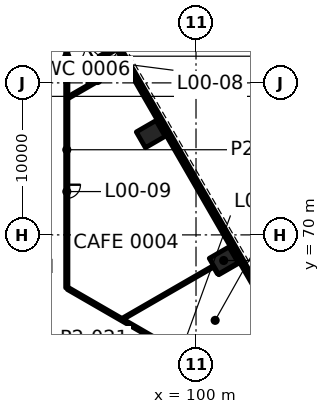
"""IFC4 building model, lengths in metres.
Left out: names, types, materials, properties, quantities, classifications, styles, units other than length and angle.
Written with IfcOpenShell. Run it as: python <this file> out.ifc"""

import sys

from ifc_helpers import new_model, si_unit, direction, frame, frame_2d, origin, origin_2d, place, context, subcontext, project, spatial, rectangle, extrude, element, fill, save


model = new_model("IFC4")
c1 = context("Model", 3, precision=1e-05, world=origin(), true_north=direction((0.0, 1.0)))
c2 = subcontext(c1, "Body", "Model", "MODEL_VIEW")
j1 = project(units=[si_unit("LENGTHUNIT", "METRE"), si_unit("PLANEANGLEUNIT", "RADIAN")], contexts=[c1])
p1 = place(None, origin())
s1 = spatial("IfcSite", under=j1, at=p1, CompositionType="ELEMENT")
p2 = place(p1, origin())
s2 = spatial("IfcBuilding", under=s1, at=p2, CompositionType="ELEMENT")
p3 = place(p2, origin())
s3 = spatial("IfcBuildingStorey", under=s2, at=p3, CompositionType="ELEMENT", Elevation=0.0)
for number, where, z_axis, x_axis in (
    (1, (101.821, 68.315, 0.0), (0.0, 0.0, 1.0), (-0.5, 0.866, 0.0)),
    (2, (97.021, 76.628, 0.0), (0.0, 0.0, 1.0), (-0.5, 0.866, 0.0)),
):
    element("IfcColumn", number, at=place(p3, frame(where, z_axis=z_axis, x_axis=x_axis)), inside=s3, PredefinedType="COLUMN", context=c2, shape_type="SweptSolid", body=[
        extrude(rectangle(XDim=1.2, YDim=1.5, at=origin_2d()), origin(), (0.0, 0.0, 1.0), 8.0),
    ])
p4 = place(p3, frame((101.471, 67.42, 0.0), z_axis=(0.0, 0.0, 1.0), x_axis=(0.866026058841, 0.499998865407, 0.0)))
e3 = element("IfcWall", 3, at=p4, inside=s3, PredefinedType="PARTITIONING", context=c2, shape_type="SweptSolid", body=[
    extrude(rectangle(XDim=1.708, YDim=0.1, at=frame_2d((0.854, 0.0))), origin(), (0.0, 0.0, 1.0), 7.1),
])
p5 = place(p3, frame((95.201, 64.493, 0.0), z_axis=(0.0, 0.0, 1.0), x_axis=(0.866031059472, 0.499990203933, 0.0)))
e4 = element("IfcWall", 4, at=p5, inside=s3, PredefinedType="PARTITIONING", context=c2, shape_type="SweptSolid", body=[
    extrude(rectangle(XDim=6.893, YDim=0.1, at=frame_2d((3.447, 0.0))), origin(), (0.0, 0.0, 1.0), 7.1),
])
p6 = place(p3, frame((91.61, 79.047, 0.0), z_axis=(0.0, 0.0, 1.0), x_axis=(0.866032485742, 0.499987733489, 0.0)))
e5 = element("IfcWall", 5, at=p6, inside=s3, PredefinedType="PARTITIONING", context=c2, shape_type="SweptSolid", body=[
    extrude(rectangle(XDim=4.435, YDim=0.12, at=frame_2d((2.217, 0.0))), origin(), (0.0, 0.0, 1.0), 6.865),
])
p7 = place(p3, frame((92.95, 81.207, 0.0), z_axis=(0.0, 0.0, 1.0), x_axis=(0.866002138589, 0.500040294336, 0.0)))
e6 = element("IfcWall", 6, at=p7, inside=s3, PredefinedType="PARTITIONING", context=c2, shape_type="SweptSolid", body=[
    extrude(rectangle(XDim=2.194, YDim=0.12, at=frame_2d((1.097, 0.0))), origin(), (0.0, 0.0, 1.0), 6.865),
])
p8 = place(p7, frame((0.468, 0.0, 0.0)))
e7 = element("IfcOpeningElement", 7, at=p8, cuts=e6, PredefinedType="OPENING", context=c2, shape_type="SweptSolid", body=[
    extrude(rectangle(XDim=0.9, YDim=2.1, at=frame_2d((0.45, 1.05))), frame((0.0, 0.07, 0.0), z_axis=(0.0, -1.0, 0.0), x_axis=(1.0, 0.0, 0.0)), (0.0, 0.0, 1.0), 0.14),
])
p9 = place(p3, frame((92.95, 79.93, 0.0), z_axis=(0.0, 0.0, 1.0), x_axis=(0.0, 1.0, 0.0)))
e8 = element("IfcWall", 8, at=p9, inside=s3, PredefinedType="PARTITIONING", context=c2, shape_type="SweptSolid", body=[
    extrude(rectangle(XDim=1.207, YDim=0.12, at=frame_2d((0.604, 0.0))), origin(), (0.0, 0.0, 1.0), 7.1),
])
p10 = place(p3, frame((91.5, 84.69, 0.0), z_axis=(0.0, 0.0, 1.0), x_axis=(0.0, -1.0, 0.0)))
e9 = element("IfcWall", 9, at=p10, inside=s3, PredefinedType="PARTITIONING", context=c2, shape_type="SweptSolid", body=[
    extrude(rectangle(XDim=18.177, YDim=0.15, at=frame_2d((9.089, 0.0))), origin(), (0.0, 0.0, 1.0), 7.1),
])
p11 = place(p10, frame((2.355, 0.0, 0.0)))
e10 = element("IfcOpeningElement", 10, at=p11, cuts=e9, PredefinedType="OPENING", context=c2, shape_type="SweptSolid", body=[
    extrude(rectangle(XDim=1.2, YDim=2.1, at=frame_2d((0.6, 1.05))), frame((0.0, 0.085, 0.0), z_axis=(0.0, -1.0, 0.0), x_axis=(1.0, 0.0, 0.0)), (0.0, 0.0, 1.0), 0.17),
])
p12 = place(p10, frame((11.39, 0.0, 0.0)))
e11 = element("IfcOpeningElement", 11, at=p12, cuts=e9, PredefinedType="OPENING", context=c2, shape_type="SweptSolid", body=[
    extrude(rectangle(XDim=0.9, YDim=2.1, at=frame_2d((0.45, 1.05))), frame((0.0, 0.085, 0.0), z_axis=(0.0, -1.0, 0.0), x_axis=(1.0, 0.0, 0.0)), (0.0, 0.0, 1.0), 0.17),
])
p13 = place(p3, frame((101.446, 67.464, 0.0), z_axis=(0.0, 0.0, 1.0), x_axis=(-0.500033033937, 0.866006330792, 0.0)))
e12 = element("IfcWall", 12, at=p13, inside=s3, PredefinedType="PARTITIONING", context=c2, shape_type="SweptSolid", body=[
    extrude(rectangle(XDim=0.499, YDim=0.1, at=frame_2d((0.25, 0.0))), origin(), (0.0, 0.0, 1.0), 7.1),
])
p14 = place(p3, frame((91.575, 66.47, 0.0), z_axis=(0.0, 0.0, 1.0), x_axis=(0.866027754727, -0.499995928025, 0.0)))
e13 = element("IfcWall", 13, at=p14, inside=s3, PredefinedType="PARTITIONING", context=c2, shape_type="SweptSolid", body=[
    extrude(rectangle(XDim=13.214, YDim=0.15, at=frame_2d((6.607, 0.0))), origin(), (0.0, 0.0, 1.0), 7.1),
])
p15 = place(p14, frame((8.091, 0.0, 0.0)))
e14 = element("IfcOpeningElement", 14, at=p15, cuts=e13, PredefinedType="OPENING", context=c2, shape_type="SweptSolid", body=[
    extrude(rectangle(XDim=0.9, YDim=2.1, at=frame_2d((0.45, 1.05))), frame((0.0, 0.085, 0.0), z_axis=(0.0, -1.0, 0.0), x_axis=(1.0, 0.0, 0.0)), (0.0, 0.0, 1.0), 0.17),
])
p16 = place(p3, frame((107.504, 60.451, 0.0), z_axis=(0.0, 0.0, 1.0), x_axis=(-0.500000550228, 0.86602508611, 0.0)))
e15 = element("IfcWall", 15, at=p16, inside=s3, PredefinedType="SOLIDWALL", context=c2, shape_type="SweptSolid", body=[
    extrude(rectangle(XDim=57.704, YDim=0.3, at=frame_2d((28.852, 0.0))), origin(), (0.0, 0.0, 1.0), 7.7),
])
p17 = place(p16, frame((56.104, 0.0, 0.0)))
e16 = element("IfcOpeningElement", 16, at=p17, cuts=e15, PredefinedType="OPENING", context=c2, shape_type="SweptSolid", body=[
    extrude(rectangle(XDim=1.2, YDim=2.4, at=frame_2d((0.6, 1.2))), frame((0.0, 0.16, 0.0), z_axis=(0.0, -1.0, 0.0), x_axis=(1.0, 0.0, 0.0)), (0.0, 0.0, 1.0), 0.32),
])
p18 = place(p16, frame((1.552, 0.0, 0.15)))
e17 = element("IfcOpeningElement", 17, at=p18, cuts=e15, PredefinedType="OPENING", context=c2, shape_type="SweptSolid", body=[
    extrude(rectangle(XDim=2.1, YDim=5.4, at=frame_2d((1.05, 2.7))), frame((0.0, 0.16, 0.0), z_axis=(0.0, -1.0, 0.0), x_axis=(1.0, 0.0, 0.0)), (0.0, 0.0, 1.0), 0.32),
])
p19 = place(p16, frame((4.052, 0.0, 0.15)))
e18 = element("IfcOpeningElement", 18, at=p19, cuts=e15, PredefinedType="OPENING", context=c2, shape_type="SweptSolid", body=[
    extrude(rectangle(XDim=2.1, YDim=5.4, at=frame_2d((1.05, 2.7))), frame((0.0, 0.16, 0.0), z_axis=(0.0, -1.0, 0.0), x_axis=(1.0, 0.0, 0.0)), (0.0, 0.0, 1.0), 0.32),
])
p20 = place(p16, frame((6.552, 0.0, 0.15)))
e19 = element("IfcOpeningElement", 19, at=p20, cuts=e15, PredefinedType="OPENING", context=c2, shape_type="SweptSolid", body=[
    extrude(rectangle(XDim=2.1, YDim=5.4, at=frame_2d((1.05, 2.7))), frame((0.0, 0.16, 0.0), z_axis=(0.0, -1.0, 0.0), x_axis=(1.0, 0.0, 0.0)), (0.0, 0.0, 1.0), 0.32),
])
p21 = place(p16, frame((9.052, 0.0, 0.15)))
e20 = element("IfcOpeningElement", 20, at=p21, cuts=e15, PredefinedType="OPENING", context=c2, shape_type="SweptSolid", body=[
    extrude(rectangle(XDim=2.1, YDim=5.4, at=frame_2d((1.05, 2.7))), frame((0.0, 0.16, 0.0), z_axis=(0.0, -1.0, 0.0), x_axis=(1.0, 0.0, 0.0)), (0.0, 0.0, 1.0), 0.32),
])
p22 = place(p16, frame((11.552, 0.0, 0.15)))
e21 = element("IfcOpeningElement", 21, at=p22, cuts=e15, PredefinedType="OPENING", context=c2, shape_type="SweptSolid", body=[
    extrude(rectangle(XDim=2.1, YDim=5.4, at=frame_2d((1.05, 2.7))), frame((0.0, 0.16, 0.0), z_axis=(0.0, -1.0, 0.0), x_axis=(1.0, 0.0, 0.0)), (0.0, 0.0, 1.0), 0.32),
])
p23 = place(p16, frame((14.052, 0.0, 0.15)))
e22 = element("IfcOpeningElement", 22, at=p23, cuts=e15, PredefinedType="OPENING", context=c2, shape_type="SweptSolid", body=[
    extrude(rectangle(XDim=2.1, YDim=5.4, at=frame_2d((1.05, 2.7))), frame((0.0, 0.16, 0.0), z_axis=(0.0, -1.0, 0.0), x_axis=(1.0, 0.0, 0.0)), (0.0, 0.0, 1.0), 0.32),
])
p24 = place(p16, frame((16.552, 0.0, 0.15)))
e23 = element("IfcOpeningElement", 23, at=p24, cuts=e15, PredefinedType="OPENING", context=c2, shape_type="SweptSolid", body=[
    extrude(rectangle(XDim=2.1, YDim=5.4, at=frame_2d((1.05, 2.7))), frame((0.0, 0.16, 0.0), z_axis=(0.0, -1.0, 0.0), x_axis=(1.0, 0.0, 0.0)), (0.0, 0.0, 1.0), 0.32),
])
p25 = place(p16, frame((19.052, 0.0, 0.15)))
e24 = element("IfcOpeningElement", 24, at=p25, cuts=e15, PredefinedType="OPENING", context=c2, shape_type="SweptSolid", body=[
    extrude(rectangle(XDim=2.1, YDim=5.4, at=frame_2d((1.05, 2.7))), frame((0.0, 0.16, 0.0), z_axis=(0.0, -1.0, 0.0), x_axis=(1.0, 0.0, 0.0)), (0.0, 0.0, 1.0), 0.32),
])
p26 = place(p16, frame((21.552, 0.0, 0.15)))
e25 = element("IfcOpeningElement", 25, at=p26, cuts=e15, PredefinedType="OPENING", context=c2, shape_type="SweptSolid", body=[
    extrude(rectangle(XDim=2.1, YDim=5.4, at=frame_2d((1.05, 2.7))), frame((0.0, 0.16, 0.0), z_axis=(0.0, -1.0, 0.0), x_axis=(1.0, 0.0, 0.0)), (0.0, 0.0, 1.0), 0.32),
])
p27 = place(p16, frame((24.052, 0.0, 0.15)))
e26 = element("IfcOpeningElement", 26, at=p27, cuts=e15, PredefinedType="OPENING", context=c2, shape_type="SweptSolid", body=[
    extrude(rectangle(XDim=2.1, YDim=5.4, at=frame_2d((1.05, 2.7))), frame((0.0, 0.16, 0.0), z_axis=(0.0, -1.0, 0.0), x_axis=(1.0, 0.0, 0.0)), (0.0, 0.0, 1.0), 0.32),
])
p28 = place(p16, frame((26.552, 0.0, 0.15)))
e27 = element("IfcOpeningElement", 27, at=p28, cuts=e15, PredefinedType="OPENING", context=c2, shape_type="SweptSolid", body=[
    extrude(rectangle(XDim=2.1, YDim=5.4, at=frame_2d((1.05, 2.7))), frame((0.0, 0.16, 0.0), z_axis=(0.0, -1.0, 0.0), x_axis=(1.0, 0.0, 0.0)), (0.0, 0.0, 1.0), 0.32),
])
p29 = place(p16, frame((29.052, 0.0, 0.15)))
e28 = element("IfcOpeningElement", 28, at=p29, cuts=e15, PredefinedType="OPENING", context=c2, shape_type="SweptSolid", body=[
    extrude(rectangle(XDim=2.1, YDim=5.4, at=frame_2d((1.05, 2.7))), frame((0.0, 0.16, 0.0), z_axis=(0.0, -1.0, 0.0), x_axis=(1.0, 0.0, 0.0)), (0.0, 0.0, 1.0), 0.32),
])
p30 = place(p16, frame((31.552, 0.0, 0.15)))
e29 = element("IfcOpeningElement", 29, at=p30, cuts=e15, PredefinedType="OPENING", context=c2, shape_type="SweptSolid", body=[
    extrude(rectangle(XDim=2.1, YDim=5.4, at=frame_2d((1.05, 2.7))), frame((0.0, 0.16, 0.0), z_axis=(0.0, -1.0, 0.0), x_axis=(1.0, 0.0, 0.0)), (0.0, 0.0, 1.0), 0.32),
])
p31 = place(p16, frame((34.052, 0.0, 0.15)))
e30 = element("IfcOpeningElement", 30, at=p31, cuts=e15, PredefinedType="OPENING", context=c2, shape_type="SweptSolid", body=[
    extrude(rectangle(XDim=2.1, YDim=5.4, at=frame_2d((1.05, 2.7))), frame((0.0, 0.16, 0.0), z_axis=(0.0, -1.0, 0.0), x_axis=(1.0, 0.0, 0.0)), (0.0, 0.0, 1.0), 0.32),
])
p32 = place(p16, frame((36.552, 0.0, 0.15)))
e31 = element("IfcOpeningElement", 31, at=p32, cuts=e15, PredefinedType="OPENING", context=c2, shape_type="SweptSolid", body=[
    extrude(rectangle(XDim=2.1, YDim=5.4, at=frame_2d((1.05, 2.7))), frame((0.0, 0.16, 0.0), z_axis=(0.0, -1.0, 0.0), x_axis=(1.0, 0.0, 0.0)), (0.0, 0.0, 1.0), 0.32),
])
p33 = place(p16, frame((39.052, 0.0, 0.15)))
e32 = element("IfcOpeningElement", 32, at=p33, cuts=e15, PredefinedType="OPENING", context=c2, shape_type="SweptSolid", body=[
    extrude(rectangle(XDim=2.1, YDim=5.4, at=frame_2d((1.05, 2.7))), frame((0.0, 0.16, 0.0), z_axis=(0.0, -1.0, 0.0), x_axis=(1.0, 0.0, 0.0)), (0.0, 0.0, 1.0), 0.32),
])
p34 = place(p16, frame((41.552, 0.0, 0.15)))
e33 = element("IfcOpeningElement", 33, at=p34, cuts=e15, PredefinedType="OPENING", context=c2, shape_type="SweptSolid", body=[
    extrude(rectangle(XDim=2.1, YDim=5.4, at=frame_2d((1.05, 2.7))), frame((0.0, 0.16, 0.0), z_axis=(0.0, -1.0, 0.0), x_axis=(1.0, 0.0, 0.0)), (0.0, 0.0, 1.0), 0.32),
])
p35 = place(p16, frame((44.052, 0.0, 0.15)))
e34 = element("IfcOpeningElement", 34, at=p35, cuts=e15, PredefinedType="OPENING", context=c2, shape_type="SweptSolid", body=[
    extrude(rectangle(XDim=2.1, YDim=5.4, at=frame_2d((1.05, 2.7))), frame((0.0, 0.16, 0.0), z_axis=(0.0, -1.0, 0.0), x_axis=(1.0, 0.0, 0.0)), (0.0, 0.0, 1.0), 0.32),
])
p36 = place(p16, frame((46.552, 0.0, 0.15)))
e35 = element("IfcOpeningElement", 35, at=p36, cuts=e15, PredefinedType="OPENING", context=c2, shape_type="SweptSolid", body=[
    extrude(rectangle(XDim=2.1, YDim=5.4, at=frame_2d((1.05, 2.7))), frame((0.0, 0.16, 0.0), z_axis=(0.0, -1.0, 0.0), x_axis=(1.0, 0.0, 0.0)), (0.0, 0.0, 1.0), 0.32),
])
p37 = place(p16, frame((49.052, 0.0, 0.15)))
e36 = element("IfcOpeningElement", 36, at=p37, cuts=e15, PredefinedType="OPENING", context=c2, shape_type="SweptSolid", body=[
    extrude(rectangle(XDim=2.1, YDim=5.4, at=frame_2d((1.05, 2.7))), frame((0.0, 0.16, 0.0), z_axis=(0.0, -1.0, 0.0), x_axis=(1.0, 0.0, 0.0)), (0.0, 0.0, 1.0), 0.32),
])
p38 = place(p16, frame((51.552, 0.0, 0.15)))
e37 = element("IfcOpeningElement", 37, at=p38, cuts=e15, PredefinedType="OPENING", context=c2, shape_type="SweptSolid", body=[
    extrude(rectangle(XDim=2.1, YDim=5.4, at=frame_2d((1.05, 2.7))), frame((0.0, 0.16, 0.0), z_axis=(0.0, -1.0, 0.0), x_axis=(1.0, 0.0, 0.0)), (0.0, 0.0, 1.0), 0.32),
])
p39 = place(p3, frame((107.106, 62.36, 0.0), z_axis=(0.0, 0.0, 1.0), x_axis=(-0.49999992739, 0.866025445706, 0.0)))
e38 = element("IfcWall", 38, at=p39, inside=s3, PredefinedType="SOLIDWALL", context=c2, shape_type="SweptSolid", body=[
    extrude(rectangle(XDim=54.0, YDim=0.4, at=frame_2d((27.0, 0.0))), origin(), (0.0, 0.0, 1.0), 7.64),
])
p40 = place(p3, frame((102.587, 70.587, 0.0), z_axis=(0.0, 0.0, 1.0), x_axis=(0.866039495442, 0.49997559174, 0.0)))
e39 = element("IfcWall", 39, at=p40, inside=s3, PredefinedType="SOLIDWALL", context=c2, shape_type="SweptSolid", body=[
    extrude(rectangle(XDim=2.95, YDim=0.25, at=frame_2d((1.475, 0.0))), origin(), (0.0, 0.0, 1.0), 7.64),
])
p41 = place(p3, frame((99.779, 75.45, 0.0), z_axis=(0.0, 0.0, 1.0), x_axis=(0.866017493347, 0.500013701029, 0.0)))
e40 = element("IfcWall", 40, at=p41, inside=s3, PredefinedType="PARTITIONING", context=c2, shape_type="SweptSolid", body=[
    extrude(rectangle(XDim=2.975, YDim=0.15, at=frame_2d((1.488, 0.0))), origin(), (0.0, 0.0, 1.0), 7.64),
])
p42 = place(p3, frame((105.25, 72.125, 0.0), z_axis=(0.0, 0.0, 1.0), x_axis=(-0.499996309931, 0.866027534236, 0.0)))
e41 = element("IfcWall", 41, at=p42, inside=s3, PredefinedType="PARTITIONING", context=c2, shape_type="SweptSolid", body=[
    extrude(rectangle(XDim=12.09, YDim=0.2, at=frame_2d((6.045, 0.0))), origin(), (0.0, 0.0, 1.0), 7.64),
])
p43 = place(p42, frame((2.365, 0.0, 0.0)))
e42 = element("IfcOpeningElement", 42, at=p43, cuts=e41, PredefinedType="OPENING", context=c2, shape_type="SweptSolid", body=[
    extrude(rectangle(XDim=0.9, YDim=2.1, at=frame_2d((0.45, 1.05))), frame((0.0, 0.11, 0.0), z_axis=(0.0, -1.0, 0.0), x_axis=(1.0, 0.0, 0.0)), (0.0, 0.0, 1.0), 0.22),
])
p44 = place(p42, frame((8.365, 0.0, 0.0)))
e43 = element("IfcOpeningElement", 43, at=p44, cuts=e41, PredefinedType="OPENING", context=c2, shape_type="SweptSolid", body=[
    extrude(rectangle(XDim=0.9, YDim=2.1, at=frame_2d((0.45, 1.05))), frame((0.0, 0.11, 0.0), z_axis=(0.0, -1.0, 0.0), x_axis=(1.0, 0.0, 0.0)), (0.0, 0.0, 1.0), 0.22),
])
p45 = place(p3, frame((96.542, 81.058, 0.0), z_axis=(0.0, 0.0, 1.0), x_axis=(0.866039495442, 0.49997559174, 0.0)))
e44 = element("IfcWall", 44, at=p45, inside=s3, PredefinedType="SOLIDWALL", context=c2, shape_type="SweptSolid", body=[
    extrude(rectangle(XDim=2.95, YDim=0.25, at=frame_2d((1.475, 0.0))), origin(), (0.0, 0.0, 1.0), 7.64),
])
p46 = place(p3, frame((112.456, 65.794, 0.0), z_axis=(0.0, 0.0, 1.0), x_axis=(-0.499998559706, 0.866026235337, 0.0)))
e45 = element("IfcWall", 45, at=p46, inside=s3, PredefinedType="PARTITIONING", context=c2, shape_type="SweptSolid", body=[
    extrude(rectangle(XDim=53.4, YDim=0.2, at=frame_2d((26.7, 0.0))), origin(), (0.0, 0.0, 1.0), 7.64),
])
p47 = place(p46, frame((12.6, 0.0, 0.0)))
e46 = element("IfcOpeningElement", 46, at=p47, cuts=e45, PredefinedType="OPENING", context=c2, shape_type="SweptSolid", body=[
    extrude(rectangle(XDim=1.8, YDim=2.1, at=frame_2d((0.9, 1.05))), frame((0.0, 0.11, 0.0), z_axis=(0.0, -1.0, 0.0), x_axis=(1.0, 0.0, 0.0)), (0.0, 0.0, 1.0), 0.22),
])
p48 = place(p46, frame((25.8, 0.0, 0.0)))
e47 = element("IfcOpeningElement", 47, at=p48, cuts=e45, PredefinedType="OPENING", context=c2, shape_type="SweptSolid", body=[
    extrude(rectangle(XDim=1.8, YDim=2.1, at=frame_2d((0.9, 1.05))), frame((0.0, 0.11, 0.0), z_axis=(0.0, -1.0, 0.0), x_axis=(1.0, 0.0, 0.0)), (0.0, 0.0, 1.0), 0.22),
])
p49 = place(p46, frame((35.0, 0.0, 0.0)))
e48 = element("IfcOpeningElement", 48, at=p49, cuts=e45, PredefinedType="OPENING", context=c2, shape_type="SweptSolid", body=[
    extrude(rectangle(XDim=1.0, YDim=2.1, at=frame_2d((0.5, 1.05))), frame((0.0, 0.11, 0.0), z_axis=(0.0, -1.0, 0.0), x_axis=(1.0, 0.0, 0.0)), (0.0, 0.0, 1.0), 0.22),
])
p50 = place(p46, frame((45.75, 0.0, 0.0)))
e49 = element("IfcOpeningElement", 49, at=p50, cuts=e45, PredefinedType="OPENING", context=c2, shape_type="SweptSolid", body=[
    extrude(rectangle(XDim=1.8, YDim=2.1, at=frame_2d((0.9, 1.05))), frame((0.0, 0.11, 0.0), z_axis=(0.0, -1.0, 0.0), x_axis=(1.0, 0.0, 0.0)), (0.0, 0.0, 1.0), 0.22),
])
p51 = place(p8, origin())
e50 = element("IfcDoor", 50, at=p51, inside=s3, OperationType="SINGLE_SWING_LEFT", PredefinedType="DOOR", context=c2, shape_type="SweptSolid", body=[
    extrude(rectangle(XDim=0.9, YDim=2.1, at=frame_2d((0.45, 1.05))), frame((0.0, 0.025, 0.0), z_axis=(0.0, -1.0, 0.0), x_axis=(1.0, 0.0, 0.0)), (0.0, 0.0, 1.0), 0.05),
])
fill(e7, e50)
p52 = place(p11, origin())
e51 = element("IfcDoor", 51, at=p52, inside=s3, OperationType="DOUBLE_DOOR_SINGLE_SWING", PredefinedType="DOOR", context=c2, shape_type="SweptSolid", body=[
    extrude(rectangle(XDim=1.2, YDim=2.1, at=frame_2d((0.6, 1.05))), frame((0.0, 0.025, 0.0), z_axis=(0.0, -1.0, 0.0), x_axis=(1.0, 0.0, 0.0)), (0.0, 0.0, 1.0), 0.05),
])
fill(e10, e51)
p53 = place(p12, origin())
e52 = element("IfcDoor", 52, at=p53, inside=s3, OperationType="SINGLE_SWING_RIGHT", PredefinedType="DOOR", context=c2, shape_type="SweptSolid", body=[
    extrude(rectangle(XDim=0.9, YDim=2.1, at=frame_2d((0.45, 1.05))), frame((0.0, 0.025, 0.0), z_axis=(0.0, -1.0, 0.0), x_axis=(1.0, 0.0, 0.0)), (0.0, 0.0, 1.0), 0.05),
])
fill(e11, e52)
p54 = place(p20, origin())
e53 = element("IfcWindow", 53, at=p54, inside=s3, PartitioningType="SINGLE_PANEL", PredefinedType="WINDOW", context=c2, shape_type="SweptSolid", body=[
    extrude(rectangle(XDim=2.1, YDim=5.4, at=frame_2d((1.05, 2.7))), frame((0.0, 0.03, 0.0), z_axis=(0.0, -1.0, 0.0), x_axis=(1.0, 0.0, 0.0)), (0.0, 0.0, 1.0), 0.06),
])
fill(e19, e53)
p55 = place(p21, origin())
e54 = element("IfcWindow", 54, at=p55, inside=s3, PartitioningType="SINGLE_PANEL", PredefinedType="WINDOW", context=c2, shape_type="SweptSolid", body=[
    extrude(rectangle(XDim=2.1, YDim=5.4, at=frame_2d((1.05, 2.7))), frame((0.0, 0.03, 0.0), z_axis=(0.0, -1.0, 0.0), x_axis=(1.0, 0.0, 0.0)), (0.0, 0.0, 1.0), 0.06),
])
fill(e20, e54)
p56 = place(p22, origin())
e55 = element("IfcWindow", 55, at=p56, inside=s3, PartitioningType="SINGLE_PANEL", PredefinedType="WINDOW", context=c2, shape_type="SweptSolid", body=[
    extrude(rectangle(XDim=2.1, YDim=5.4, at=frame_2d((1.05, 2.7))), frame((0.0, 0.03, 0.0), z_axis=(0.0, -1.0, 0.0), x_axis=(1.0, 0.0, 0.0)), (0.0, 0.0, 1.0), 0.06),
])
fill(e21, e55)
p57 = place(p23, origin())
e56 = element("IfcWindow", 56, at=p57, inside=s3, PartitioningType="SINGLE_PANEL", PredefinedType="WINDOW", context=c2, shape_type="SweptSolid", body=[
    extrude(rectangle(XDim=2.1, YDim=5.4, at=frame_2d((1.05, 2.7))), frame((0.0, 0.03, 0.0), z_axis=(0.0, -1.0, 0.0), x_axis=(1.0, 0.0, 0.0)), (0.0, 0.0, 1.0), 0.06),
])
fill(e22, e56)
p58 = place(p24, origin())
e57 = element("IfcWindow", 57, at=p58, inside=s3, PartitioningType="SINGLE_PANEL", PredefinedType="WINDOW", context=c2, shape_type="SweptSolid", body=[
    extrude(rectangle(XDim=2.1, YDim=5.4, at=frame_2d((1.05, 2.7))), frame((0.0, 0.03, 0.0), z_axis=(0.0, -1.0, 0.0), x_axis=(1.0, 0.0, 0.0)), (0.0, 0.0, 1.0), 0.06),
])
fill(e23, e57)
p59 = place(p25, origin())
e58 = element("IfcWindow", 58, at=p59, inside=s3, PartitioningType="SINGLE_PANEL", PredefinedType="WINDOW", context=c2, shape_type="SweptSolid", body=[
    extrude(rectangle(XDim=2.1, YDim=5.4, at=frame_2d((1.05, 2.7))), frame((0.0, 0.03, 0.0), z_axis=(0.0, -1.0, 0.0), x_axis=(1.0, 0.0, 0.0)), (0.0, 0.0, 1.0), 0.06),
])
fill(e24, e58)
p60 = place(p26, origin())
e59 = element("IfcWindow", 59, at=p60, inside=s3, PartitioningType="SINGLE_PANEL", PredefinedType="WINDOW", context=c2, shape_type="SweptSolid", body=[
    extrude(rectangle(XDim=2.1, YDim=5.4, at=frame_2d((1.05, 2.7))), frame((0.0, 0.03, 0.0), z_axis=(0.0, -1.0, 0.0), x_axis=(1.0, 0.0, 0.0)), (0.0, 0.0, 1.0), 0.06),
])
fill(e25, e59)
p61 = place(p27, origin())
e60 = element("IfcWindow", 60, at=p61, inside=s3, PartitioningType="SINGLE_PANEL", PredefinedType="WINDOW", context=c2, shape_type="SweptSolid", body=[
    extrude(rectangle(XDim=2.1, YDim=5.4, at=frame_2d((1.05, 2.7))), frame((0.0, 0.03, 0.0), z_axis=(0.0, -1.0, 0.0), x_axis=(1.0, 0.0, 0.0)), (0.0, 0.0, 1.0), 0.06),
])
fill(e26, e60)
p62 = place(p44, origin())
e61 = element("IfcDoor", 61, at=p62, inside=s3, OperationType="SINGLE_SWING_RIGHT", PredefinedType="DOOR", context=c2, shape_type="SweptSolid", body=[
    extrude(rectangle(XDim=0.9, YDim=2.1, at=frame_2d((0.45, 1.05))), frame((0.0, 0.025, 0.0), z_axis=(0.0, -1.0, 0.0), x_axis=(1.0, 0.0, 0.0)), (0.0, 0.0, 1.0), 0.05),
])
fill(e43, e61)
save(model, sys.argv[1])
